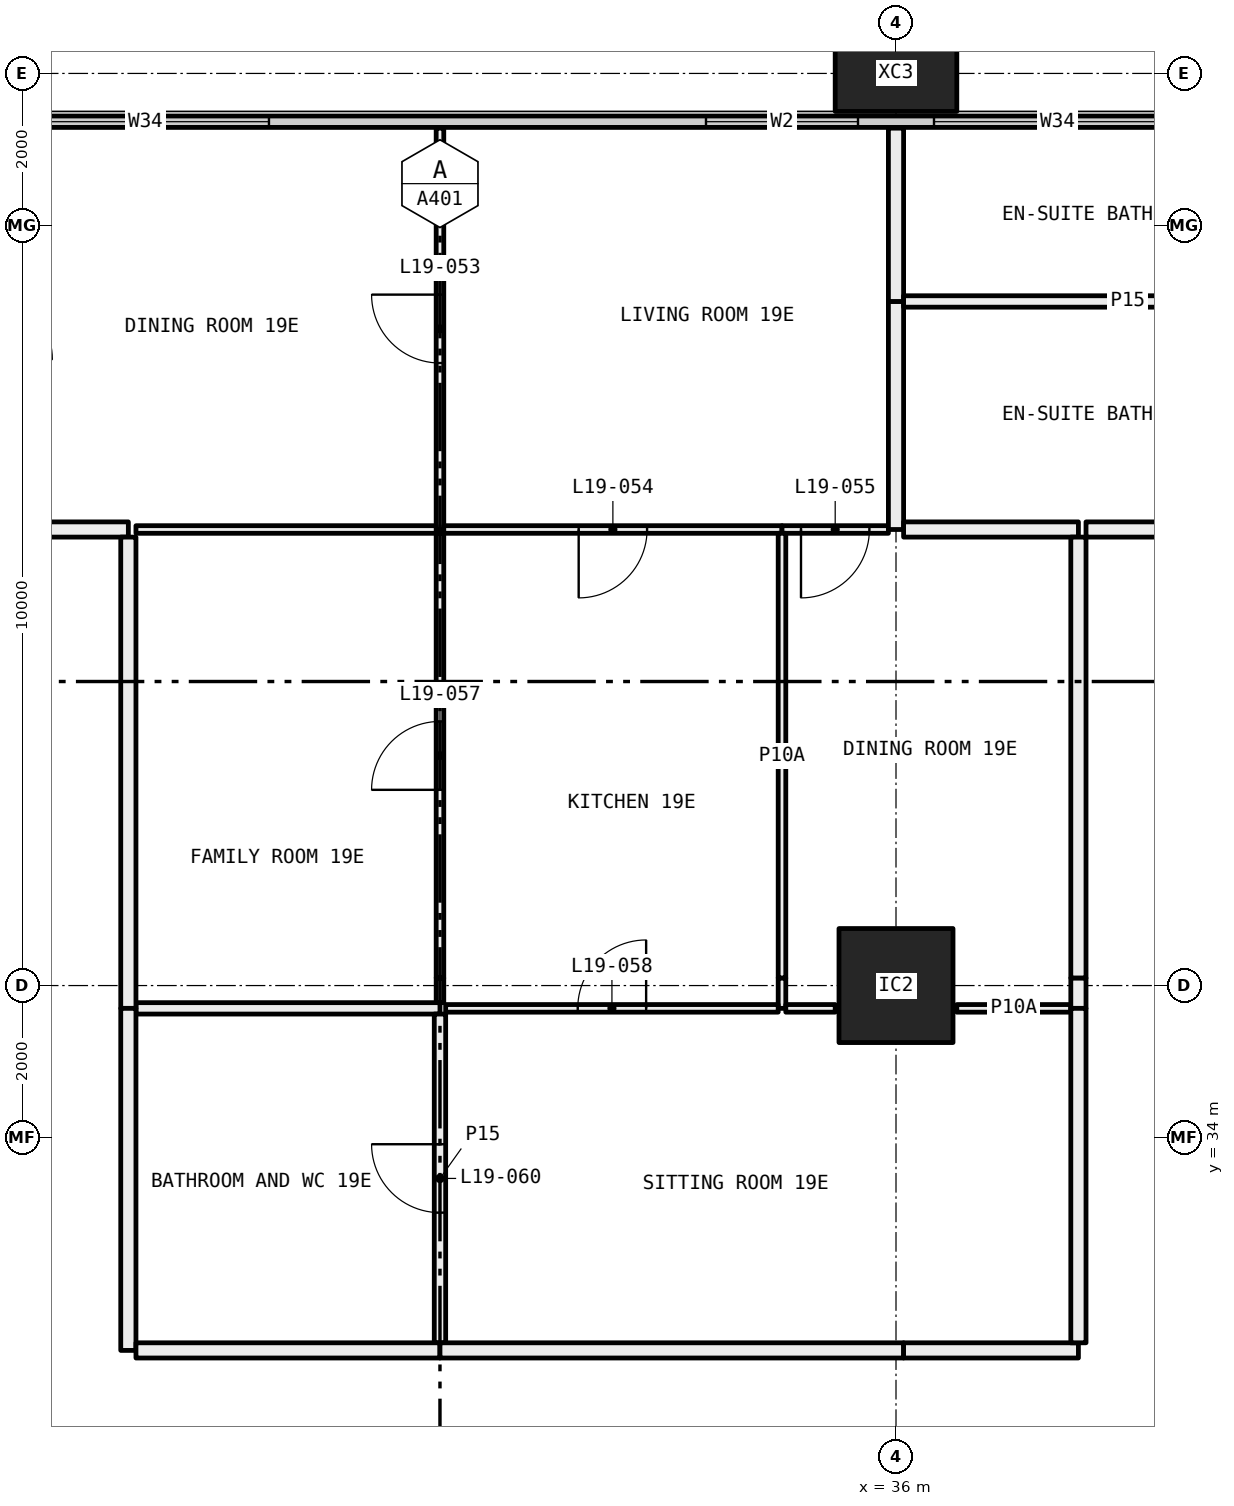
"""IFC4 building model, lengths in metres.
Left out: names, types, materials, properties, quantities, classifications, styles, units other than length and angle.
Written with IfcOpenShell. Run it as: python <this file> out.ifc"""

import sys

from ifc_helpers import new_model, si_unit, direction, frame, frame_2d, origin, origin_2d, place, context, subcontext, project, spatial, rectangle, hollow_rectangle, extrude, element, fill, save


model = new_model("IFC4")
c1 = context("Model", 3, precision=1e-05, world=origin(), true_north=direction((0.0, 1.0)))
c2 = subcontext(c1, "Body", "Model", "MODEL_VIEW")
j1 = project(units=[si_unit("LENGTHUNIT", "METRE"), si_unit("PLANEANGLEUNIT", "RADIAN")], contexts=[c1])
p1 = place(None, origin())
s1 = spatial("IfcSite", under=j1, at=p1, CompositionType="ELEMENT")
p2 = place(p1, origin())
s2 = spatial("IfcBuilding", under=s1, at=p2, CompositionType="ELEMENT")
p3 = place(p2, frame((0.0, 0.0, 78.3)))
s3 = spatial("IfcBuildingStorey", under=s2, at=p3, CompositionType="ELEMENT", Elevation=78.3)
p4 = place(p3, frame((36.0, 36.0, 0.0), z_axis=(0.0, 0.0, 1.0), x_axis=(1.0, 0.0, 0.0)))
e1 = element("IfcColumn", 1, at=p4, inside=s3, PredefinedType="COLUMN", context=c2, shape_type="SweptSolid", body=[
    extrude(hollow_rectangle(XDim=1.5, YDim=1.5, WallThickness=0.065, at=origin_2d()), origin(), (0.0, 0.0, 1.0), 3.05),
])
p5 = place(p3, frame((36.0, 48.0, -0.4), z_axis=(0.0, 0.0, 1.0), x_axis=(1.0, 0.0, 0.0)))
e2 = element("IfcColumn", 2, at=p5, inside=s3, PredefinedType="COLUMN", context=c2, shape_type="SweptSolid", body=[
    extrude(hollow_rectangle(XDim=1.6, YDim=1.0, WallThickness=0.065, at=origin_2d()), origin(), (0.0, 0.0, 1.0), 3.45),
])
p6 = place(p3, frame((6.56, 47.365, 0.0), z_axis=(0.0, 0.0, 1.0), x_axis=(1.0, 0.0, 0.0)))
e3 = element("IfcWall", 3, at=p6, inside=s3, PredefinedType="ELEMENTEDWALL", context=c2, shape_type="SweptSolid", body=[
    extrude(rectangle(XDim=58.88, YDim=0.15, at=frame_2d((29.44, 0.0))), origin(), (0.0, 0.0, 1.0), 3.05),
])
p7 = place(p6, frame((0.44, 0.0, 0.45)))
e4 = element("IfcOpeningElement", 4, at=p7, cuts=e3, PredefinedType="OPENING", context=c2, shape_type="SweptSolid", body=[
    extrude(rectangle(XDim=4.5, YDim=2.55, at=frame_2d((2.25, 1.275))), frame((0.0, 0.085, 0.0), z_axis=(0.0, -1.0, 0.0), x_axis=(1.0, 0.0, 0.0)), (0.0, 0.0, 1.0), 0.17),
])
p8 = place(p6, frame((5.94, 0.0, 0.45)))
e5 = element("IfcOpeningElement", 5, at=p8, cuts=e3, PredefinedType="OPENING", context=c2, shape_type="SweptSolid", body=[
    extrude(rectangle(XDim=3.25, YDim=2.55, at=frame_2d((1.625, 1.275))), frame((0.0, 0.085, 0.0), z_axis=(0.0, -1.0, 0.0), x_axis=(1.0, 0.0, 0.0)), (0.0, 0.0, 1.0), 0.17),
])
p9 = place(p6, frame((13.69, 0.0, 0.45)))
e6 = element("IfcOpeningElement", 6, at=p9, cuts=e3, PredefinedType="OPENING", context=c2, shape_type="SweptSolid", body=[
    extrude(rectangle(XDim=3.25, YDim=2.55, at=frame_2d((1.625, 1.275))), frame((0.0, 0.085, 0.0), z_axis=(0.0, -1.0, 0.0), x_axis=(1.0, 0.0, 0.0)), (0.0, 0.0, 1.0), 0.17),
])
p10 = place(p6, frame((17.94, 0.0, 0.45)))
e7 = element("IfcOpeningElement", 7, at=p10, cuts=e3, PredefinedType="OPENING", context=c2, shape_type="SweptSolid", body=[
    extrude(rectangle(XDim=3.25, YDim=2.55, at=frame_2d((1.625, 1.275))), frame((0.0, 0.085, 0.0), z_axis=(0.0, -1.0, 0.0), x_axis=(1.0, 0.0, 0.0)), (0.0, 0.0, 1.0), 0.17),
])
p11 = place(p6, frame((26.94, 0.0, 0.45)))
e8 = element("IfcOpeningElement", 8, at=p11, cuts=e3, PredefinedType="OPENING", context=c2, shape_type="SweptSolid", body=[
    extrude(rectangle(XDim=2.0, YDim=2.55, at=frame_2d((1.0, 1.275))), frame((0.0, 0.085, 0.0), z_axis=(0.0, -1.0, 0.0), x_axis=(1.0, 0.0, 0.0)), (0.0, 0.0, 1.0), 0.17),
])
p12 = place(p6, frame((29.94, 0.0, 0.45)))
e9 = element("IfcOpeningElement", 9, at=p12, cuts=e3, PredefinedType="OPENING", context=c2, shape_type="SweptSolid", body=[
    extrude(rectangle(XDim=3.25, YDim=2.55, at=frame_2d((1.625, 1.275))), frame((0.0, 0.085, 0.0), z_axis=(0.0, -1.0, 0.0), x_axis=(1.0, 0.0, 0.0)), (0.0, 0.0, 1.0), 0.17),
])
p13 = place(p6, frame((37.69, 0.0, 0.45)))
e10 = element("IfcOpeningElement", 10, at=p13, cuts=e3, PredefinedType="OPENING", context=c2, shape_type="SweptSolid", body=[
    extrude(rectangle(XDim=3.25, YDim=2.55, at=frame_2d((1.625, 1.275))), frame((0.0, 0.085, 0.0), z_axis=(0.0, -1.0, 0.0), x_axis=(1.0, 0.0, 0.0)), (0.0, 0.0, 1.0), 0.17),
])
p14 = place(p6, frame((41.94, 0.0, 0.45)))
e11 = element("IfcOpeningElement", 11, at=p14, cuts=e3, PredefinedType="OPENING", context=c2, shape_type="SweptSolid", body=[
    extrude(rectangle(XDim=3.25, YDim=2.55, at=frame_2d((1.625, 1.275))), frame((0.0, 0.085, 0.0), z_axis=(0.0, -1.0, 0.0), x_axis=(1.0, 0.0, 0.0)), (0.0, 0.0, 1.0), 0.17),
])
p15 = place(p6, frame((50.94, 0.0, 0.45)))
e12 = element("IfcOpeningElement", 12, at=p15, cuts=e3, PredefinedType="OPENING", context=c2, shape_type="SweptSolid", body=[
    extrude(rectangle(XDim=2.0, YDim=2.55, at=frame_2d((1.0, 1.275))), frame((0.0, 0.085, 0.0), z_axis=(0.0, -1.0, 0.0), x_axis=(1.0, 0.0, 0.0)), (0.0, 0.0, 1.0), 0.17),
])
p16 = place(p6, frame((53.94, 0.0, 0.45)))
e13 = element("IfcOpeningElement", 13, at=p16, cuts=e3, PredefinedType="OPENING", context=c2, shape_type="SweptSolid", body=[
    extrude(rectangle(XDim=4.5, YDim=2.55, at=frame_2d((2.25, 1.275))), frame((0.0, 0.085, 0.0), z_axis=(0.0, -1.0, 0.0), x_axis=(1.0, 0.0, 0.0)), (0.0, 0.0, 1.0), 0.17),
])
p17 = place(p3, frame((30.0, 42.0, 0.0), z_axis=(0.0, 0.0, 1.0), x_axis=(0.0, 1.0, 0.0)))
e14 = element("IfcWall", 14, at=p17, inside=s3, PredefinedType="PARTITIONING", context=c2, shape_type="SweptSolid", body=[
    extrude(rectangle(XDim=5.28, YDim=0.1, at=frame_2d((2.64, 0.0))), origin(), (0.0, 0.0, 1.0), 3.05),
])
p18 = place(p17, frame((2.19, 0.0, 0.0)))
e15 = element("IfcOpeningElement", 15, at=p18, cuts=e14, PredefinedType="OPENING", context=c2, shape_type="SweptSolid", body=[
    extrude(rectangle(XDim=0.9, YDim=2.1, at=frame_2d((0.45, 1.05))), frame((0.0, 0.06, 0.0), z_axis=(0.0, -1.0, 0.0), x_axis=(1.0, 0.0, 0.0)), (0.0, 0.0, 1.0), 0.12),
])
p19 = place(p3, frame((26.0, 42.0, 0.0), z_axis=(0.0, 0.0, 1.0), x_axis=(1.0, 0.0, 0.0)))
e16 = element("IfcWall", 16, at=p19, inside=s3, PredefinedType="PARTITIONING", context=c2, shape_type="SweptSolid", body=[
    extrude(rectangle(XDim=3.95, YDim=0.1, at=frame_2d((1.975, 0.0))), origin(), (0.0, 0.0, 1.0), 3.05),
])
p20 = place(p3, frame((24.0, 42.0, 0.0), z_axis=(0.0, 0.0, 1.0), x_axis=(1.0, 0.0, 0.0)))
e17 = element("IfcWall", 17, at=p20, inside=s3, PredefinedType="PARTITIONING", context=c2, shape_type="SweptSolid", body=[
    extrude(rectangle(XDim=1.9, YDim=0.2, at=frame_2d((0.95, 0.0))), origin(), (0.0, 0.0, 1.0), 3.05),
])
p21 = place(p3, frame((30.05, 42.0, 0.0), z_axis=(0.0, 0.0, 1.0), x_axis=(1.0, 0.0, 0.0)))
e18 = element("IfcWall", 18, at=p21, inside=s3, PredefinedType="PARTITIONING", context=c2, shape_type="SweptSolid", body=[
    extrude(rectangle(XDim=4.45, YDim=0.1, at=frame_2d((2.225, 0.0))), origin(), (0.0, 0.0, 1.0), 3.05),
])
p22 = place(p21, frame((1.775, 0.0, 0.0)))
e19 = element("IfcOpeningElement", 19, at=p22, cuts=e18, PredefinedType="OPENING", context=c2, shape_type="SweptSolid", body=[
    extrude(rectangle(XDim=0.9, YDim=2.1, at=frame_2d((0.45, 1.05))), frame((0.0, 0.06, 0.0), z_axis=(0.0, -1.0, 0.0), x_axis=(1.0, 0.0, 0.0)), (0.0, 0.0, 1.0), 0.12),
])
p23 = place(p3, frame((34.5, 42.0, 0.0), z_axis=(0.0, 0.0, 1.0), x_axis=(1.0, 0.0, 0.0)))
e20 = element("IfcWall", 20, at=p23, inside=s3, PredefinedType="PARTITIONING", context=c2, shape_type="SweptSolid", body=[
    extrude(rectangle(XDim=1.4, YDim=0.1, at=frame_2d((0.7, 0.0))), origin(), (0.0, 0.0, 1.0), 3.05),
])
p24 = place(p23, frame((0.25, 0.0, 0.0)))
e21 = element("IfcOpeningElement", 21, at=p24, cuts=e20, PredefinedType="OPENING", context=c2, shape_type="SweptSolid", body=[
    extrude(rectangle(XDim=0.9, YDim=2.1, at=frame_2d((0.45, 1.05))), frame((0.0, 0.06, 0.0), z_axis=(0.0, -1.0, 0.0), x_axis=(1.0, 0.0, 0.0)), (0.0, 0.0, 1.0), 0.12),
])
p25 = place(p3, frame((36.0, 42.0, 0.0), z_axis=(0.0, 0.0, 1.0), x_axis=(0.0, 1.0, 0.0)))
e22 = element("IfcWall", 22, at=p25, inside=s3, PredefinedType="PARTITIONING", context=c2, shape_type="SweptSolid", body=[
    extrude(rectangle(XDim=3.0, YDim=0.2, at=frame_2d((1.5, 0.0))), origin(), (0.0, 0.0, 1.0), 2.45),
])
p26 = place(p3, frame((36.0, 45.0, 0.0), z_axis=(0.0, 0.0, 1.0), x_axis=(0.0, 1.0, 0.0)))
e23 = element("IfcWall", 23, at=p26, inside=s3, PredefinedType="PARTITIONING", context=c2, shape_type="SweptSolid", body=[
    extrude(rectangle(XDim=2.28, YDim=0.2, at=frame_2d((1.14, 0.0))), origin(), (0.0, 0.0, 1.0), 2.45),
])
p27 = place(p3, frame((30.0, 35.775, 0.0), z_axis=(0.0, 0.0, 1.0), x_axis=(0.0, 1.0, 0.0)))
e24 = element("IfcWall", 24, at=p27, inside=s3, PredefinedType="PARTITIONING", context=c2, shape_type="SweptSolid", body=[
    extrude(rectangle(XDim=0.325, YDim=0.1, at=frame_2d((0.163, 0.0))), origin(), (0.0, 0.0, 1.0), 2.45),
])
p28 = place(p3, frame((30.0, 36.1, 0.0), z_axis=(0.0, 0.0, 1.0), x_axis=(0.0, 1.0, 0.0)))
e25 = element("IfcWall", 25, at=p28, inside=s3, PredefinedType="PARTITIONING", context=c2, shape_type="SweptSolid", body=[
    extrude(rectangle(XDim=5.85, YDim=0.1, at=frame_2d((2.925, 0.0))), origin(), (0.0, 0.0, 1.0), 3.05),
])
p29 = place(p28, frame((2.475, 0.0, 0.0)))
e26 = element("IfcOpeningElement", 26, at=p29, cuts=e25, PredefinedType="OPENING", context=c2, shape_type="SweptSolid", body=[
    extrude(rectangle(XDim=0.9, YDim=2.1, at=frame_2d((0.45, 1.05))), frame((0.0, 0.06, 0.0), z_axis=(0.0, -1.0, 0.0), x_axis=(1.0, 0.0, 0.0)), (0.0, 0.0, 1.0), 0.12),
])
p30 = place(p3, frame((26.0, 35.7, 0.0), z_axis=(0.0, 0.0, 1.0), x_axis=(1.0, 0.0, 0.0)))
e27 = element("IfcWall", 27, at=p30, inside=s3, PredefinedType="PARTITIONING", context=c2, shape_type="SweptSolid", body=[
    extrude(rectangle(XDim=4.0, YDim=0.15, at=frame_2d((2.0, 0.0))), origin(), (0.0, 0.0, 1.0), 3.05),
])
p31 = place(p3, frame((25.9, 41.9, 0.0), z_axis=(0.0, 0.0, 1.0), x_axis=(0.0, -1.0, 0.0)))
e28 = element("IfcWall", 28, at=p31, inside=s3, PredefinedType="PARTITIONING", context=c2, shape_type="SweptSolid", body=[
    extrude(rectangle(XDim=6.2, YDim=0.2, at=frame_2d((3.1, 0.0))), origin(), (0.0, 0.0, 1.0), 2.45),
])
p32 = place(p3, frame((34.5, 35.7, 0.0), z_axis=(0.0, 0.0, 1.0), x_axis=(0.0, 1.0, 0.0)))
e29 = element("IfcWall", 29, at=p32, inside=s3, PredefinedType="PARTITIONING", context=c2, shape_type="SweptSolid", body=[
    extrude(rectangle(XDim=0.4, YDim=0.1, at=frame_2d((0.2, 0.0))), origin(), (0.0, 0.0, 1.0), 2.45),
])
p33 = place(p3, frame((34.5, 36.1, 0.0), z_axis=(0.0, 0.0, 1.0), x_axis=(0.0, 1.0, 0.0)))
e30 = element("IfcWall", 30, at=p33, inside=s3, PredefinedType="PARTITIONING", context=c2, shape_type="SweptSolid", body=[
    extrude(rectangle(XDim=5.85, YDim=0.1, at=frame_2d((2.925, 0.0))), origin(), (0.0, 0.0, 1.0), 3.05),
])
p34 = place(p3, frame((30.075, 35.7, 0.0), z_axis=(0.0, 0.0, 1.0), x_axis=(1.0, 0.0, 0.0)))
e31 = element("IfcWall", 31, at=p34, inside=s3, PredefinedType="PARTITIONING", context=c2, shape_type="SweptSolid", body=[
    extrude(rectangle(XDim=4.375, YDim=0.1, at=frame_2d((2.188, 0.0))), origin(), (0.0, 0.0, 1.0), 3.05),
])
p35 = place(p34, frame((1.738, 0.0, 0.0)))
e32 = element("IfcOpeningElement", 32, at=p35, cuts=e31, PredefinedType="OPENING", context=c2, shape_type="SweptSolid", body=[
    extrude(rectangle(XDim=0.9, YDim=2.1, at=frame_2d((0.45, 1.05))), frame((0.0, 0.06, 0.0), z_axis=(0.0, -1.0, 0.0), x_axis=(1.0, 0.0, 0.0)), (0.0, 0.0, 1.0), 0.12),
])
p36 = place(p3, frame((34.55, 35.7, 0.0), z_axis=(0.0, 0.0, 1.0), x_axis=(1.0, 0.0, 0.0)))
e33 = element("IfcWall", 33, at=p36, inside=s3, PredefinedType="PARTITIONING", context=c2, shape_type="SweptSolid", body=[
    extrude(rectangle(XDim=0.65, YDim=0.1, at=frame_2d((0.325, 0.0))), origin(), (0.0, 0.0, 1.0), 3.05),
])
p37 = place(p3, frame((36.8, 35.7, 0.0), z_axis=(0.0, 0.0, 1.0), x_axis=(1.0, 0.0, 0.0)))
e34 = element("IfcWall", 34, at=p37, inside=s3, PredefinedType="PARTITIONING", context=c2, shape_type="SweptSolid", body=[
    extrude(rectangle(XDim=1.5, YDim=0.1, at=frame_2d((0.75, 0.0))), origin(), (0.0, 0.0, 1.0), 3.05),
])
p38 = place(p3, frame((38.4, 42.0, 0.0), z_axis=(0.0, 0.0, 1.0), x_axis=(-1.0, 0.0, 0.0)))
e35 = element("IfcWall", 35, at=p38, inside=s3, PredefinedType="PARTITIONING", context=c2, shape_type="SweptSolid", body=[
    extrude(rectangle(XDim=2.3, YDim=0.2, at=frame_2d((1.15, 0.0))), origin(), (0.0, 0.0, 1.0), 3.05),
])
p39 = place(p3, frame((38.4, 35.7, 0.0), z_axis=(0.0, 0.0, 1.0), x_axis=(0.0, 1.0, 0.0)))
e36 = element("IfcWall", 36, at=p39, inside=s3, PredefinedType="PARTITIONING", context=c2, shape_type="SweptSolid", body=[
    extrude(rectangle(XDim=0.4, YDim=0.2, at=frame_2d((0.2, 0.0))), origin(), (0.0, 0.0, 1.0), 2.45),
])
p40 = place(p3, frame((38.4, 36.1, 0.0), z_axis=(0.0, 0.0, 1.0), x_axis=(0.0, 1.0, 0.0)))
e37 = element("IfcWall", 37, at=p40, inside=s3, PredefinedType="PARTITIONING", context=c2, shape_type="SweptSolid", body=[
    extrude(rectangle(XDim=5.8, YDim=0.2, at=frame_2d((2.9, 0.0))), origin(), (0.0, 0.0, 1.0), 3.05),
])
p41 = place(p3, frame((30.0, 31.3, 0.0), z_axis=(0.0, 0.0, 1.0), x_axis=(0.0, 1.0, 0.0)))
e38 = element("IfcWall", 38, at=p41, inside=s3, PredefinedType="PARTITIONING", context=c2, shape_type="SweptSolid", body=[
    extrude(rectangle(XDim=4.325, YDim=0.15, at=frame_2d((2.163, 0.0))), origin(), (0.0, 0.0, 1.0), 3.05),
])
p42 = place(p41, frame((1.712, 0.0, 0.0)))
e39 = element("IfcOpeningElement", 39, at=p42, cuts=e38, PredefinedType="OPENING", context=c2, shape_type="SweptSolid", body=[
    extrude(rectangle(XDim=0.9, YDim=2.1, at=frame_2d((0.45, 1.05))), frame((0.0, 0.085, 0.0), z_axis=(0.0, -1.0, 0.0), x_axis=(1.0, 0.0, 0.0)), (0.0, 0.0, 1.0), 0.17),
])
p43 = place(p3, frame((25.9, 35.7, 0.0), z_axis=(0.0, 0.0, 1.0), x_axis=(0.0, -1.0, 0.0)))
e40 = element("IfcWall", 40, at=p43, inside=s3, PredefinedType="PARTITIONING", context=c2, shape_type="SweptSolid", body=[
    extrude(rectangle(XDim=4.5, YDim=0.2, at=frame_2d((2.25, 0.0))), origin(), (0.0, 0.0, 1.0), 3.05),
])
p44 = place(p3, frame((26.0, 31.2, 0.0), z_axis=(0.0, 0.0, 1.0), x_axis=(1.0, 0.0, 0.0)))
e41 = element("IfcWall", 41, at=p44, inside=s3, PredefinedType="PARTITIONING", context=c2, shape_type="SweptSolid", body=[
    extrude(rectangle(XDim=4.0, YDim=0.2, at=frame_2d((2.0, 0.0))), origin(), (0.0, 0.0, 1.0), 3.05),
])
p45 = place(p3, frame((30.0, 31.2, 0.0), z_axis=(0.0, 0.0, 1.0), x_axis=(1.0, 0.0, 0.0)))
e42 = element("IfcWall", 42, at=p45, inside=s3, PredefinedType="PARTITIONING", context=c2, shape_type="SweptSolid", body=[
    extrude(rectangle(XDim=6.1, YDim=0.2, at=frame_2d((3.05, 0.0))), origin(), (0.0, 0.0, 1.0), 2.45),
])
p46 = place(p3, frame((36.1, 31.2, 0.0), z_axis=(0.0, 0.0, 1.0), x_axis=(1.0, 0.0, 0.0)))
e43 = element("IfcWall", 43, at=p46, inside=s3, PredefinedType="PARTITIONING", context=c2, shape_type="SweptSolid", body=[
    extrude(rectangle(XDim=2.3, YDim=0.2, at=frame_2d((1.15, 0.0))), origin(), (0.0, 0.0, 1.0), 3.05),
])
p47 = place(p3, frame((38.4, 31.3, 0.0), z_axis=(0.0, 0.0, 1.0), x_axis=(0.0, 1.0, 0.0)))
e44 = element("IfcWall", 44, at=p47, inside=s3, PredefinedType="PARTITIONING", context=c2, shape_type="SweptSolid", body=[
    extrude(rectangle(XDim=4.4, YDim=0.2, at=frame_2d((2.2, 0.0))), origin(), (0.0, 0.0, 1.0), 3.05),
])
p48 = place(p3, frame((42.0, 45.0, 0.0), z_axis=(0.0, 0.0, 1.0), x_axis=(-1.0, 0.0, 0.0)))
e45 = element("IfcWall", 45, at=p48, inside=s3, PredefinedType="PARTITIONING", context=c2, shape_type="SweptSolid", body=[
    extrude(rectangle(XDim=5.9, YDim=0.15, at=frame_2d((2.95, 0.0))), origin(), (0.0, 0.0, 1.0), 3.05),
])
p49 = place(p3, frame((38.5, 42.0, 0.0), z_axis=(0.0, 0.0, 1.0), x_axis=(1.0, 0.0, 0.0)))
e46 = element("IfcWall", 46, at=p49, inside=s3, PredefinedType="PARTITIONING", context=c2, shape_type="SweptSolid", body=[
    extrude(rectangle(XDim=2.3, YDim=0.2, at=frame_2d((1.15, 0.0))), origin(), (0.0, 0.0, 1.0), 3.05),
])
p50 = place(p10, origin())
e47 = element("IfcWindow", 47, at=p50, inside=s3, PartitioningType="SINGLE_PANEL", PredefinedType="WINDOW", context=c2, shape_type="SweptSolid", body=[
    extrude(rectangle(XDim=3.25, YDim=2.55, at=frame_2d((1.625, 1.275))), frame((0.0, 0.03, 0.0), z_axis=(0.0, -1.0, 0.0), x_axis=(1.0, 0.0, 0.0)), (0.0, 0.0, 1.0), 0.06),
])
fill(e7, e47)
p51 = place(p11, origin())
e48 = element("IfcWindow", 48, at=p51, inside=s3, PartitioningType="SINGLE_PANEL", PredefinedType="WINDOW", context=c2, shape_type="SweptSolid", body=[
    extrude(rectangle(XDim=2.0, YDim=2.55, at=frame_2d((1.0, 1.275))), frame((0.0, 0.03, 0.0), z_axis=(0.0, -1.0, 0.0), x_axis=(1.0, 0.0, 0.0)), (0.0, 0.0, 1.0), 0.06),
])
fill(e8, e48)
p52 = place(p12, origin())
e49 = element("IfcWindow", 49, at=p52, inside=s3, PartitioningType="SINGLE_PANEL", PredefinedType="WINDOW", context=c2, shape_type="SweptSolid", body=[
    extrude(rectangle(XDim=3.25, YDim=2.55, at=frame_2d((1.625, 1.275))), frame((0.0, 0.03, 0.0), z_axis=(0.0, -1.0, 0.0), x_axis=(1.0, 0.0, 0.0)), (0.0, 0.0, 1.0), 0.06),
])
fill(e9, e49)
p53 = place(p18, origin())
e50 = element("IfcDoor", 50, at=p53, inside=s3, OperationType="SINGLE_SWING_LEFT", PredefinedType="DOOR", context=c2, shape_type="SweptSolid", body=[
    extrude(rectangle(XDim=0.9, YDim=2.1, at=frame_2d((0.45, 1.05))), frame((0.0, 0.025, 0.0), z_axis=(0.0, -1.0, 0.0), x_axis=(1.0, 0.0, 0.0)), (0.0, 0.0, 1.0), 0.05),
])
fill(e15, e50)
p54 = place(p22, frame((0.9, 0.0, 0.0), x_axis=(-1.0, 0.0, 0.0)))
e51 = element("IfcDoor", 51, at=p54, inside=s3, OperationType="SINGLE_SWING_LEFT", PredefinedType="DOOR", context=c2, shape_type="SweptSolid", body=[
    extrude(rectangle(XDim=0.9, YDim=2.1, at=frame_2d((0.45, 1.05))), frame((0.0, 0.025, 0.0), z_axis=(0.0, -1.0, 0.0), x_axis=(1.0, 0.0, 0.0)), (0.0, 0.0, 1.0), 0.05),
])
fill(e19, e51)
p55 = place(p24, frame((0.9, 0.0, 0.0), x_axis=(-1.0, 0.0, 0.0)))
e52 = element("IfcDoor", 52, at=p55, inside=s3, OperationType="SINGLE_SWING_LEFT", PredefinedType="DOOR", context=c2, shape_type="SweptSolid", body=[
    extrude(rectangle(XDim=0.9, YDim=2.1, at=frame_2d((0.45, 1.05))), frame((0.0, 0.025, 0.0), z_axis=(0.0, -1.0, 0.0), x_axis=(1.0, 0.0, 0.0)), (0.0, 0.0, 1.0), 0.05),
])
fill(e21, e52)
p56 = place(p29, origin())
e53 = element("IfcDoor", 53, at=p56, inside=s3, OperationType="SINGLE_SWING_RIGHT", PredefinedType="DOOR", context=c2, shape_type="SweptSolid", body=[
    extrude(rectangle(XDim=0.9, YDim=2.1, at=frame_2d((0.45, 1.05))), frame((0.0, 0.025, 0.0), z_axis=(0.0, -1.0, 0.0), x_axis=(1.0, 0.0, 0.0)), (0.0, 0.0, 1.0), 0.05),
])
fill(e26, e53)
p57 = place(p35, origin())
e54 = element("IfcDoor", 54, at=p57, inside=s3, OperationType="SINGLE_SWING_LEFT", PredefinedType="DOOR", context=c2, shape_type="SweptSolid", body=[
    extrude(rectangle(XDim=0.9, YDim=2.1, at=frame_2d((0.45, 1.05))), frame((0.0, 0.025, 0.0), z_axis=(0.0, -1.0, 0.0), x_axis=(1.0, 0.0, 0.0)), (0.0, 0.0, 1.0), 0.05),
])
fill(e32, e54)
p58 = place(p42, origin())
e55 = element("IfcDoor", 55, at=p58, inside=s3, OperationType="SINGLE_SWING_LEFT", PredefinedType="DOOR", context=c2, shape_type="SweptSolid", body=[
    extrude(rectangle(XDim=0.9, YDim=2.1, at=frame_2d((0.45, 1.05))), frame((0.0, 0.025, 0.0), z_axis=(0.0, -1.0, 0.0), x_axis=(1.0, 0.0, 0.0)), (0.0, 0.0, 1.0), 0.05),
])
fill(e39, e55)
save(model, sys.argv[1])
